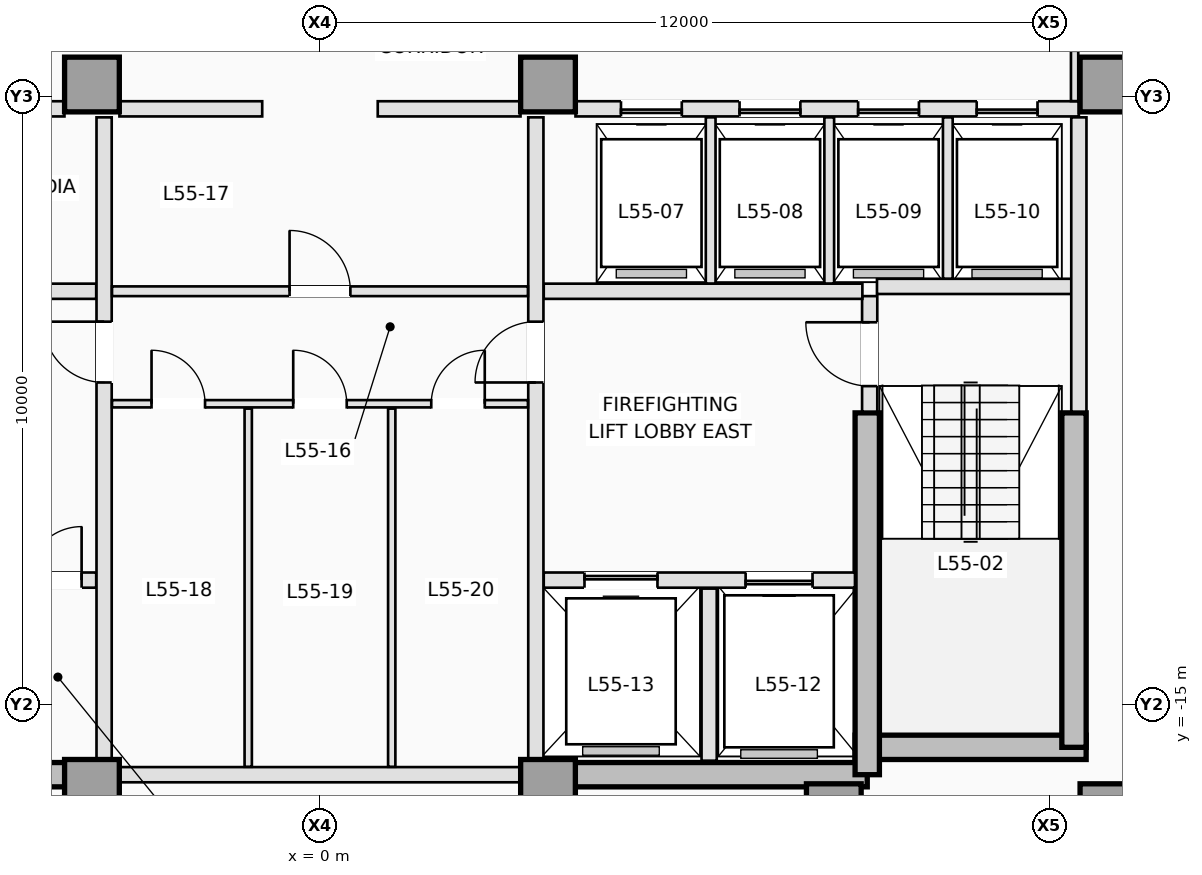
"""IFC4 building model, lengths in metres.
Left out: names, types, materials, properties, quantities, classifications, styles, units other than length and angle.
Written with IfcOpenShell. Run it as: python <this file> out.ifc"""

import sys

from ifc_helpers import new_model, si_unit, direction, frame, frame_2d, origin, origin_2d, place, context, subcontext, project, spatial, rectangle, extrude, element, fill, save


model = new_model("IFC4")
c1 = context("Model", 3, precision=1e-05, world=origin(), true_north=direction((0.0, 1.0)))
c2 = subcontext(c1, "Body", "Model", "MODEL_VIEW")
j1 = project(units=[si_unit("LENGTHUNIT", "METRE"), si_unit("PLANEANGLEUNIT", "RADIAN")], contexts=[c1])
p1 = place(None, origin())
s1 = spatial("IfcSite", under=j1, at=p1, CompositionType="ELEMENT")
p2 = place(p1, origin())
s2 = spatial("IfcBuilding", under=s1, at=p2, CompositionType="ELEMENT")
p3 = place(p2, frame((0.0, 0.0, 200.9)))
s3 = spatial("IfcBuildingStorey", under=s2, at=p3, CompositionType="ELEMENT", Elevation=200.9)
for number, where, z_axis, x_axis in (
    (1, (-9.0, -16.15, 0.0), (0.0, 0.0, 1.0), (1.0, 0.0, 0.0)),
    (2, (3.75, -16.15, 0.0), (0.0, 0.0, 1.0), (1.0, 0.0, 0.0)),
):
    element("IfcWall", number, at=place(p3, frame(where, z_axis=z_axis, x_axis=x_axis)), inside=s3, PredefinedType="SHEAR", context=c2, shape_type="SweptSolid", body=[
        extrude(rectangle(XDim=5.25, YDim=0.4, at=frame_2d((2.625, 0.0))), origin(), (0.0, 0.0, 1.0), 3.5),
    ])
p4 = place(p3, frame((8.8, -15.7, 0.0), z_axis=(0.0, 0.0, 1.0), x_axis=(1.0, 0.0, 0.0)))
e3 = element("IfcWall", 3, at=p4, inside=s3, PredefinedType="SHEAR", context=c2, shape_type="SweptSolid", body=[
    extrude(rectangle(XDim=3.8, YDim=0.4, at=frame_2d((1.9, 0.0))), origin(), (0.0, 0.0, 1.0), 3.5),
])
p5 = place(p3, frame((12.4, -15.7, 0.0), z_axis=(0.0, 0.0, 1.0), x_axis=(0.0, 1.0, 0.0)))
e4 = element("IfcWall", 4, at=p5, inside=s3, PredefinedType="SHEAR", context=c2, shape_type="SweptSolid", body=[
    extrude(rectangle(XDim=5.5, YDim=0.4, at=frame_2d((2.75, 0.0))), origin(), (0.0, 0.0, 1.0), 3.5),
])
p6 = place(p3, frame((9.0, -16.15, 0.0), z_axis=(0.0, 0.0, 1.0), x_axis=(0.0, 1.0, 0.0)))
e5 = element("IfcWall", 5, at=p6, inside=s3, PredefinedType="SHEAR", context=c2, shape_type="SweptSolid", body=[
    extrude(rectangle(XDim=5.95, YDim=0.4, at=frame_2d((2.975, 0.0))), origin(), (0.0, 0.0, 1.0), 3.5),
])
for number, where, z_axis, x_axis in (
    (6, (-3.75, -16.35, 0.0), (0.0, 0.0, 1.0), (1.0, 0.0, 0.0)),
    (7, (3.75, -16.35, 0.0), (0.0, 0.0, 1.0), (1.0, 0.0, 0.0)),
    (8, (8.45, -16.75, 0.0), (0.0, 0.0, 1.0), (1.0, 0.0, 0.0)),
    (9, (12.95, -16.75, 0.0), (0.0, 0.0, 1.0), (1.0, 0.0, 0.0)),
    (10, (-3.75, -4.8, 0.0), (0.0, 0.0, 1.0), (1.0, 0.0, 0.0)),
    (11, (3.75, -4.8, 0.0), (0.0, 0.0, 1.0), (1.0, 0.0, 0.0)),
    (12, (12.95, -4.8, 0.0), (0.0, 0.0, 1.0), (1.0, 0.0, 0.0)),
):
    element("IfcColumn", number, at=place(p3, frame(where, z_axis=z_axis, x_axis=x_axis)), inside=s3, PredefinedType="COLUMN", context=c2, shape_type="SweptSolid", body=[
        extrude(rectangle(XDim=0.9, YDim=0.9, at=origin_2d()), origin(), (0.0, 0.0, 1.0), 3.5),
    ])
p7 = place(p3, frame((9.04, -10.18, 0.0), z_axis=(0.0, 0.0, 1.0), x_axis=(0.0, 1.0, 0.0)))
e13 = element("IfcWall", 13, at=p7, inside=s3, PredefinedType="PARTITIONING", context=c2, shape_type="SweptSolid", body=[
    extrude(rectangle(XDim=1.9, YDim=0.25, at=frame_2d((0.95, 0.0))), origin(), (0.0, 0.0, 1.0), 3.25),
])
p8 = place(p7, frame((0.42, 0.0, 0.0)))
e14 = element("IfcOpeningElement", 14, at=p8, cuts=e13, PredefinedType="OPENING", context=c2, shape_type="SweptSolid", body=[
    extrude(rectangle(XDim=1.05, YDim=2.15, at=frame_2d((0.525, 1.075))), frame((0.0, 0.135, 0.0), z_axis=(0.0, -1.0, 0.0), x_axis=(1.0, 0.0, 0.0)), (0.0, 0.0, 1.0), 0.27),
])
p9 = place(p3, frame((9.16, -8.12, 0.0), z_axis=(0.0, 0.0, 1.0), x_axis=(1.0, 0.0, 0.0)))
e15 = element("IfcWall", 15, at=p9, inside=s3, PredefinedType="PARTITIONING", context=c2, shape_type="SweptSolid", body=[
    extrude(rectangle(XDim=3.22, YDim=0.25, at=frame_2d((1.61, 0.0))), origin(), (0.0, 0.0, 1.0), 3.25),
])
p10 = place(p3, frame((12.48, -10.18, 0.0), z_axis=(0.0, 0.0, 1.0), x_axis=(0.0, 1.0, 0.0)))
e16 = element("IfcWall", 16, at=p10, inside=s3, PredefinedType="PARTITIONING", context=c2, shape_type="SweptSolid", body=[
    extrude(rectangle(XDim=4.84, YDim=0.25, at=frame_2d((2.42, 0.0))), origin(), (0.0, 0.0, 1.0), 3.25),
])
p11 = place(p3, frame((-8.798, -12.95, 0.0), z_axis=(0.0, 0.0, 1.0), x_axis=(1.0, 0.0, 0.0)))
e17 = element("IfcWall", 17, at=p11, inside=s3, PredefinedType="PARTITIONING", context=c2, shape_type="SweptSolid", body=[
    extrude(rectangle(XDim=5.118, YDim=0.25, at=frame_2d((2.559, 0.0))), origin(), (0.0, 0.0, 1.0), 3.25),
])
p12 = place(p11, frame((0.698, 0.0, 0.0)))
e18 = element("IfcOpeningElement", 18, at=p12, cuts=e17, PredefinedType="OPENING", context=c2, shape_type="SweptSolid", body=[
    extrude(rectangle(XDim=1.1, YDim=2.15, at=frame_2d((0.55, 1.075))), frame((0.0, 0.135, 0.0), z_axis=(0.0, -1.0, 0.0), x_axis=(1.0, 0.0, 0.0)), (0.0, 0.0, 1.0), 0.27),
])
p13 = place(p11, frame((2.598, 0.0, 0.0)))
e19 = element("IfcOpeningElement", 19, at=p13, cuts=e17, PredefinedType="OPENING", context=c2, shape_type="SweptSolid", body=[
    extrude(rectangle(XDim=0.88, YDim=2.1, at=frame_2d((0.44, 1.05))), frame((0.0, 0.135, 0.0), z_axis=(0.0, -1.0, 0.0), x_axis=(1.0, 0.0, 0.0)), (0.0, 0.0, 1.0), 0.27),
])
p14 = place(p11, frame((3.998, 0.0, 0.0)))
e20 = element("IfcOpeningElement", 20, at=p14, cuts=e17, PredefinedType="OPENING", context=c2, shape_type="SweptSolid", body=[
    extrude(rectangle(XDim=0.88, YDim=2.1, at=frame_2d((0.44, 1.05))), frame((0.0, 0.135, 0.0), z_axis=(0.0, -1.0, 0.0), x_axis=(1.0, 0.0, 0.0)), (0.0, 0.0, 1.0), 0.27),
])
p15 = place(p3, frame((3.68, -12.95, 0.0), z_axis=(0.0, 0.0, 1.0), x_axis=(1.0, 0.0, 0.0)))
e21 = element("IfcWall", 21, at=p15, inside=s3, PredefinedType="PARTITIONING", context=c2, shape_type="SweptSolid", body=[
    extrude(rectangle(XDim=5.118, YDim=0.25, at=frame_2d((2.559, 0.0))), origin(), (0.0, 0.0, 1.0), 3.25),
])
p16 = place(p15, frame((3.32, 0.0, 0.0)))
e22 = element("IfcOpeningElement", 22, at=p16, cuts=e21, PredefinedType="OPENING", context=c2, shape_type="SweptSolid", body=[
    extrude(rectangle(XDim=1.1, YDim=2.15, at=frame_2d((0.55, 1.075))), frame((0.0, 0.135, 0.0), z_axis=(0.0, -1.0, 0.0), x_axis=(1.0, 0.0, 0.0)), (0.0, 0.0, 1.0), 0.27),
])
p17 = place(p15, frame((0.67, 0.0, 0.0)))
e23 = element("IfcOpeningElement", 23, at=p17, cuts=e21, PredefinedType="OPENING", context=c2, shape_type="SweptSolid", body=[
    extrude(rectangle(XDim=1.2, YDim=2.15, at=frame_2d((0.6, 1.075))), frame((0.0, 0.135, 0.0), z_axis=(0.0, -1.0, 0.0), x_axis=(1.0, 0.0, 0.0)), (0.0, 0.0, 1.0), 0.27),
])
p18 = place(p3, frame((6.4, -15.92, 0.0), z_axis=(0.0, 0.0, 1.0), x_axis=(0.0, 1.0, 0.0)))
e24 = element("IfcWall", 24, at=p18, inside=s3, PredefinedType="PARTITIONING", context=c2, shape_type="SweptSolid", body=[
    extrude(rectangle(XDim=2.83, YDim=0.25, at=frame_2d((1.415, 0.0))), origin(), (0.0, 0.0, 1.0), 3.25),
])
for number, where, z_axis, x_axis in (
    (25, (-8.92, -8.2, 0.0), (0.0, 0.0, 1.0), (1.0, 0.0, 0.0)),
    (26, (3.68, -8.2, 0.0), (0.0, 0.0, 1.0), (1.0, 0.0, 0.0)),
):
    element("IfcWall", number, at=place(p3, frame(where, z_axis=z_axis, x_axis=x_axis)), inside=s3, PredefinedType="PARTITIONING", context=c2, shape_type="SweptSolid", body=[
        extrude(rectangle(XDim=5.24, YDim=0.25, at=frame_2d((2.62, 0.0))), origin(), (0.0, 0.0, 1.0), 3.25),
    ])
p19 = place(p3, frame((-3.55, -15.898, 0.0), z_axis=(0.0, 0.0, 1.0), x_axis=(0.0, 1.0, 0.0)))
e27 = element("IfcWall", 27, at=p19, inside=s3, PredefinedType="PARTITIONING", context=c2, shape_type="SweptSolid", body=[
    extrude(rectangle(XDim=10.558, YDim=0.25, at=frame_2d((5.279, 0.0))), origin(), (0.0, 0.0, 1.0), 3.25),
])
p20 = place(p19, frame((6.198, 0.0, 0.0)))
e28 = element("IfcOpeningElement", 28, at=p20, cuts=e27, PredefinedType="OPENING", context=c2, shape_type="SweptSolid", body=[
    extrude(rectangle(XDim=1.0, YDim=2.15, at=frame_2d((0.5, 1.075))), frame((0.0, 0.135, 0.0), z_axis=(0.0, -1.0, 0.0), x_axis=(1.0, 0.0, 0.0)), (0.0, 0.0, 1.0), 0.27),
])
p21 = place(p3, frame((3.55, -15.898, 0.0), z_axis=(0.0, 0.0, 1.0), x_axis=(0.0, 1.0, 0.0)))
e29 = element("IfcWall", 29, at=p21, inside=s3, PredefinedType="PARTITIONING", context=c2, shape_type="SweptSolid", body=[
    extrude(rectangle(XDim=10.558, YDim=0.25, at=frame_2d((5.279, 0.0))), origin(), (0.0, 0.0, 1.0), 3.25),
])
p22 = place(p21, frame((6.198, 0.0, 0.0)))
e30 = element("IfcOpeningElement", 30, at=p22, cuts=e29, PredefinedType="OPENING", context=c2, shape_type="SweptSolid", body=[
    extrude(rectangle(XDim=1.0, YDim=2.15, at=frame_2d((0.5, 1.075))), frame((0.0, 0.135, 0.0), z_axis=(0.0, -1.0, 0.0), x_axis=(1.0, 0.0, 0.0)), (0.0, 0.0, 1.0), 0.27),
])
p23 = place(p3, frame((-12.48, -5.2, 0.0), z_axis=(0.0, 0.0, 1.0), x_axis=(1.0, 0.0, 0.0)))
e31 = element("IfcWall", 31, at=p23, inside=s3, PredefinedType="PARTITIONING", context=c2, shape_type="SweptSolid", body=[
    extrude(rectangle(XDim=8.278, YDim=0.25, at=frame_2d((4.139, 0.0))), origin(), (0.0, 0.0, 1.0), 3.25),
])
p24 = place(p23, frame((3.05, 0.0, 0.0)))
e32 = element("IfcOpeningElement", 32, at=p24, cuts=e31, PredefinedType="OPENING", context=c2, shape_type="SweptSolid", body=[
    extrude(rectangle(XDim=0.92, YDim=2.12, at=frame_2d((0.46, 1.06))), frame((0.0, 0.135, 0.0), z_axis=(0.0, -1.0, 0.0), x_axis=(1.0, 0.0, 0.0)), (0.0, 0.0, 1.0), 0.27),
])
p25 = place(p23, frame((6.15, 0.0, 0.0)))
e33 = element("IfcOpeningElement", 33, at=p25, cuts=e31, PredefinedType="OPENING", context=c2, shape_type="SweptSolid", body=[
    extrude(rectangle(XDim=0.92, YDim=2.12, at=frame_2d((0.46, 1.06))), frame((0.0, 0.135, 0.0), z_axis=(0.0, -1.0, 0.0), x_axis=(1.0, 0.0, 0.0)), (0.0, 0.0, 1.0), 0.27),
])
p26 = place(p3, frame((4.202, -5.2, 0.0), z_axis=(0.0, 0.0, 1.0), x_axis=(1.0, 0.0, 0.0)))
e34 = element("IfcWall", 34, at=p26, inside=s3, PredefinedType="PARTITIONING", context=c2, shape_type="SweptSolid", body=[
    extrude(rectangle(XDim=8.278, YDim=0.25, at=frame_2d((4.139, 0.0))), origin(), (0.0, 0.0, 1.0), 3.25),
])
p27 = place(p26, frame((0.748, 0.0, 0.0)))
e35 = element("IfcOpeningElement", 35, at=p27, cuts=e34, PredefinedType="OPENING", context=c2, shape_type="SweptSolid", body=[
    extrude(rectangle(XDim=1.0, YDim=2.15, at=frame_2d((0.5, 1.075))), frame((0.0, 0.135, 0.0), z_axis=(0.0, -1.0, 0.0), x_axis=(1.0, 0.0, 0.0)), (0.0, 0.0, 1.0), 0.27),
])
p28 = place(p26, frame((2.698, 0.0, 0.0)))
e36 = element("IfcOpeningElement", 36, at=p28, cuts=e34, PredefinedType="OPENING", context=c2, shape_type="SweptSolid", body=[
    extrude(rectangle(XDim=1.0, YDim=2.15, at=frame_2d((0.5, 1.075))), frame((0.0, 0.135, 0.0), z_axis=(0.0, -1.0, 0.0), x_axis=(1.0, 0.0, 0.0)), (0.0, 0.0, 1.0), 0.27),
])
p29 = place(p26, frame((4.648, 0.0, 0.0)))
e37 = element("IfcOpeningElement", 37, at=p29, cuts=e34, PredefinedType="OPENING", context=c2, shape_type="SweptSolid", body=[
    extrude(rectangle(XDim=1.0, YDim=2.15, at=frame_2d((0.5, 1.075))), frame((0.0, 0.135, 0.0), z_axis=(0.0, -1.0, 0.0), x_axis=(1.0, 0.0, 0.0)), (0.0, 0.0, 1.0), 0.27),
])
p30 = place(p26, frame((6.598, 0.0, 0.0)))
e38 = element("IfcOpeningElement", 38, at=p30, cuts=e34, PredefinedType="OPENING", context=c2, shape_type="SweptSolid", body=[
    extrude(rectangle(XDim=1.0, YDim=2.15, at=frame_2d((0.5, 1.075))), frame((0.0, 0.135, 0.0), z_axis=(0.0, -1.0, 0.0), x_axis=(1.0, 0.0, 0.0)), (0.0, 0.0, 1.0), 0.27),
])
for number, where, z_axis, x_axis in (
    (39, (-3.298, -5.2, 0.0), (0.0, 0.0, 1.0), (1.0, 0.0, 0.0)),
    (40, (0.95, -5.2, 0.0), (0.0, 0.0, 1.0), (1.0, 0.0, 0.0)),
):
    element("IfcWall", number, at=place(p3, frame(where, z_axis=z_axis, x_axis=x_axis)), inside=s3, PredefinedType="PARTITIONING", context=c2, shape_type="SweptSolid", body=[
        extrude(rectangle(XDim=2.348, YDim=0.25, at=frame_2d((1.174, 0.0))), origin(), (0.0, 0.0, 1.0), 3.25),
    ])
for number, where, z_axis, x_axis in (
    (41, (6.425, -8.073, 0.0), (0.0, 0.0, 1.0), (0.0, 1.0, 0.0)),
    (42, (8.375, -8.073, 0.0), (0.0, 0.0, 1.0), (0.0, 1.0, 0.0)),
):
    element("IfcWall", number, at=place(p3, frame(where, z_axis=z_axis, x_axis=x_axis)), inside=s3, PredefinedType="PARTITIONING", context=c2, shape_type="SweptSolid", body=[
        extrude(rectangle(XDim=2.733, YDim=0.16, at=frame_2d((1.366, 0.0))), origin(), (0.0, 0.0, 1.0), 3.25),
    ])
p31 = place(p3, frame((10.325, -7.993, 0.0), z_axis=(0.0, 0.0, 1.0), x_axis=(0.0, 1.0, 0.0)))
e43 = element("IfcWall", 43, at=p31, inside=s3, PredefinedType="PARTITIONING", context=c2, shape_type="SweptSolid", body=[
    extrude(rectangle(XDim=2.653, YDim=0.16, at=frame_2d((1.326, 0.0))), origin(), (0.0, 0.0, 1.0), 3.25),
])
p32 = place(p3, frame((-3.298, -16.15, 0.0), z_axis=(0.0, 0.0, 1.0), x_axis=(1.0, 0.0, 0.0)))
e44 = element("IfcWall", 44, at=p32, inside=s3, PredefinedType="PARTITIONING", context=c2, shape_type="SweptSolid", body=[
    extrude(rectangle(XDim=6.596, YDim=0.25, at=frame_2d((3.298, 0.0))), origin(), (0.0, 0.0, 1.0), 2.45),
])
p33 = place(p3, frame((-3.42, -8.2, 0.0), z_axis=(0.0, 0.0, 1.0), x_axis=(1.0, 0.0, 0.0)))
e45 = element("IfcWall", 45, at=p33, inside=s3, PredefinedType="PARTITIONING", context=c2, shape_type="SweptSolid", body=[
    extrude(rectangle(XDim=6.84, YDim=0.16, at=frame_2d((3.42, 0.0))), origin(), (0.0, 0.0, 1.0), 3.25),
])
p34 = place(p33, frame((2.92, 0.0, 0.0)))
e46 = element("IfcOpeningElement", 46, at=p34, cuts=e45, PredefinedType="OPENING", context=c2, shape_type="SweptSolid", body=[
    extrude(rectangle(XDim=1.0, YDim=2.15, at=frame_2d((0.5, 1.075))), frame((0.0, 0.09, 0.0), z_axis=(0.0, -1.0, 0.0), x_axis=(1.0, 0.0, 0.0)), (0.0, 0.0, 1.0), 0.18),
])
p35 = place(p3, frame((-3.42, -10.05, 0.0), z_axis=(0.0, 0.0, 1.0), x_axis=(1.0, 0.0, 0.0)))
e47 = element("IfcWall", 47, at=p35, inside=s3, PredefinedType="PARTITIONING", context=c2, shape_type="SweptSolid", body=[
    extrude(rectangle(XDim=6.84, YDim=0.12, at=frame_2d((3.42, 0.0))), origin(), (0.0, 0.0, 1.0), 3.25),
])
p36 = place(p35, frame((0.65, 0.0, 0.0)))
e48 = element("IfcOpeningElement", 48, at=p36, cuts=e47, PredefinedType="OPENING", context=c2, shape_type="SweptSolid", body=[
    extrude(rectangle(XDim=0.88, YDim=2.12, at=frame_2d((0.44, 1.06))), frame((0.0, 0.07, 0.0), z_axis=(0.0, -1.0, 0.0), x_axis=(1.0, 0.0, 0.0)), (0.0, 0.0, 1.0), 0.14),
])
p37 = place(p35, frame((2.98, 0.0, 0.0)))
e49 = element("IfcOpeningElement", 49, at=p37, cuts=e47, PredefinedType="OPENING", context=c2, shape_type="SweptSolid", body=[
    extrude(rectangle(XDim=0.88, YDim=2.12, at=frame_2d((0.44, 1.06))), frame((0.0, 0.07, 0.0), z_axis=(0.0, -1.0, 0.0), x_axis=(1.0, 0.0, 0.0)), (0.0, 0.0, 1.0), 0.14),
])
p38 = place(p35, frame((5.25, 0.0, 0.0)))
e50 = element("IfcOpeningElement", 50, at=p38, cuts=e47, PredefinedType="OPENING", context=c2, shape_type="SweptSolid", body=[
    extrude(rectangle(XDim=0.88, YDim=2.12, at=frame_2d((0.44, 1.06))), frame((0.0, 0.07, 0.0), z_axis=(0.0, -1.0, 0.0), x_axis=(1.0, 0.0, 0.0)), (0.0, 0.0, 1.0), 0.14),
])
for number, where, z_axis, x_axis in (
    (51, (-1.18, -16.02, 0.0), (0.0, 0.0, 1.0), (0.0, 1.0, 0.0)),
    (52, (1.18, -16.02, 0.0), (0.0, 0.0, 1.0), (0.0, 1.0, 0.0)),
):
    element("IfcWall", number, at=place(p3, frame(where, z_axis=z_axis, x_axis=x_axis)), inside=s3, PredefinedType="PARTITIONING", context=c2, shape_type="SweptSolid", body=[
        extrude(rectangle(XDim=5.89, YDim=0.12, at=frame_2d((2.945, 0.0))), origin(), (0.0, 0.0, 1.0), 3.25),
    ])
p39 = place(p3, frame((12.41, -2.462, 0.0), z_axis=(0.0, 0.0, 1.0), x_axis=(0.0, -1.0, 0.0)))
e53 = element("IfcWall", 53, at=p39, inside=s3, PredefinedType="PARTITIONING", context=c2, shape_type="SweptSolid", body=[
    extrude(rectangle(XDim=2.611, YDim=0.12, at=frame_2d((1.306, 0.0))), origin(), (0.0, 0.0, 1.0), 3.25),
])
p40 = place(p39, frame((0.863, 0.0, 0.0)))
e54 = element("IfcOpeningElement", 54, at=p40, cuts=e53, PredefinedType="OPENING", context=c2, shape_type="SweptSolid", body=[
    extrude(rectangle(XDim=0.92, YDim=2.12, at=frame_2d((0.46, 1.06))), frame((0.0, 0.07, 0.0), z_axis=(0.0, -1.0, 0.0), x_axis=(1.0, 0.0, 0.0)), (0.0, 0.0, 1.0), 0.14),
])
p41 = place(p27, origin())
e55 = element("IfcDoor", 55, at=p41, inside=s3, OperationType="SLIDING_TO_RIGHT", PredefinedType="DOOR", context=c2, shape_type="SweptSolid", body=[
    extrude(rectangle(XDim=1.0, YDim=2.15, at=frame_2d((0.5, 1.075))), frame((0.0, 0.025, 0.0), z_axis=(0.0, -1.0, 0.0), x_axis=(1.0, 0.0, 0.0)), (0.0, 0.0, 1.0), 0.05),
])
fill(e35, e55)
p42 = place(p28, origin())
e56 = element("IfcDoor", 56, at=p42, inside=s3, OperationType="SLIDING_TO_RIGHT", PredefinedType="DOOR", context=c2, shape_type="SweptSolid", body=[
    extrude(rectangle(XDim=1.0, YDim=2.15, at=frame_2d((0.5, 1.075))), frame((0.0, 0.025, 0.0), z_axis=(0.0, -1.0, 0.0), x_axis=(1.0, 0.0, 0.0)), (0.0, 0.0, 1.0), 0.05),
])
fill(e36, e56)
p43 = place(p29, origin())
e57 = element("IfcDoor", 57, at=p43, inside=s3, OperationType="SLIDING_TO_RIGHT", PredefinedType="DOOR", context=c2, shape_type="SweptSolid", body=[
    extrude(rectangle(XDim=1.0, YDim=2.15, at=frame_2d((0.5, 1.075))), frame((0.0, 0.025, 0.0), z_axis=(0.0, -1.0, 0.0), x_axis=(1.0, 0.0, 0.0)), (0.0, 0.0, 1.0), 0.05),
])
fill(e37, e57)
p44 = place(p30, origin())
e58 = element("IfcDoor", 58, at=p44, inside=s3, OperationType="SLIDING_TO_RIGHT", PredefinedType="DOOR", context=c2, shape_type="SweptSolid", body=[
    extrude(rectangle(XDim=1.0, YDim=2.15, at=frame_2d((0.5, 1.075))), frame((0.0, 0.025, 0.0), z_axis=(0.0, -1.0, 0.0), x_axis=(1.0, 0.0, 0.0)), (0.0, 0.0, 1.0), 0.05),
])
fill(e38, e58)
p45 = place(p16, origin())
e59 = element("IfcDoor", 59, at=p45, inside=s3, OperationType="SLIDING_TO_RIGHT", PredefinedType="DOOR", context=c2, shape_type="SweptSolid", body=[
    extrude(rectangle(XDim=1.1, YDim=2.15, at=frame_2d((0.55, 1.075))), frame((0.0, 0.025, 0.0), z_axis=(0.0, -1.0, 0.0), x_axis=(1.0, 0.0, 0.0)), (0.0, 0.0, 1.0), 0.05),
])
fill(e22, e59)
p46 = place(p17, origin())
e60 = element("IfcDoor", 60, at=p46, inside=s3, OperationType="SLIDING_TO_LEFT", PredefinedType="DOOR", context=c2, shape_type="SweptSolid", body=[
    extrude(rectangle(XDim=1.2, YDim=2.15, at=frame_2d((0.6, 1.075))), frame((0.0, 0.025, 0.0), z_axis=(0.0, -1.0, 0.0), x_axis=(1.0, 0.0, 0.0)), (0.0, 0.0, 1.0), 0.05),
])
fill(e23, e60)
p47 = place(p8, origin())
e61 = element("IfcDoor", 61, at=p47, inside=s3, OperationType="SINGLE_SWING_RIGHT", PredefinedType="DOOR", context=c2, shape_type="SweptSolid", body=[
    extrude(rectangle(XDim=1.05, YDim=2.15, at=frame_2d((0.525, 1.075))), frame((0.0, 0.025, 0.0), z_axis=(0.0, -1.0, 0.0), x_axis=(1.0, 0.0, 0.0)), (0.0, 0.0, 1.0), 0.05),
])
fill(e14, e61)
p48 = place(p14, origin())
e62 = element("IfcDoor", 62, at=p48, inside=s3, OperationType="SINGLE_SWING_RIGHT", PredefinedType="TRAPDOOR", context=c2, shape_type="SweptSolid", body=[
    extrude(rectangle(XDim=0.88, YDim=2.1, at=frame_2d((0.44, 1.05))), frame((0.0, 0.025, 0.0), z_axis=(0.0, -1.0, 0.0), x_axis=(1.0, 0.0, 0.0)), (0.0, 0.0, 1.0), 0.05),
])
fill(e20, e62)
p49 = place(p20, origin())
e63 = element("IfcDoor", 63, at=p49, inside=s3, OperationType="SINGLE_SWING_RIGHT", PredefinedType="DOOR", context=c2, shape_type="SweptSolid", body=[
    extrude(rectangle(XDim=1.0, YDim=2.15, at=frame_2d((0.5, 1.075))), frame((0.0, 0.025, 0.0), z_axis=(0.0, -1.0, 0.0), x_axis=(1.0, 0.0, 0.0)), (0.0, 0.0, 1.0), 0.05),
])
fill(e28, e63)
p50 = place(p22, origin())
e64 = element("IfcDoor", 64, at=p50, inside=s3, OperationType="SINGLE_SWING_LEFT", PredefinedType="DOOR", context=c2, shape_type="SweptSolid", body=[
    extrude(rectangle(XDim=1.0, YDim=2.15, at=frame_2d((0.5, 1.075))), frame((0.0, 0.025, 0.0), z_axis=(0.0, -1.0, 0.0), x_axis=(1.0, 0.0, 0.0)), (0.0, 0.0, 1.0), 0.05),
])
fill(e30, e64)
p51 = place(p34, origin())
e65 = element("IfcDoor", 65, at=p51, inside=s3, OperationType="SINGLE_SWING_LEFT", PredefinedType="DOOR", context=c2, shape_type="SweptSolid", body=[
    extrude(rectangle(XDim=1.0, YDim=2.15, at=frame_2d((0.5, 1.075))), frame((0.0, 0.025, 0.0), z_axis=(0.0, -1.0, 0.0), x_axis=(1.0, 0.0, 0.0)), (0.0, 0.0, 1.0), 0.05),
])
fill(e46, e65)
p52 = place(p36, origin())
e66 = element("IfcDoor", 66, at=p52, inside=s3, OperationType="SINGLE_SWING_LEFT", PredefinedType="DOOR", context=c2, shape_type="SweptSolid", body=[
    extrude(rectangle(XDim=0.88, YDim=2.12, at=frame_2d((0.44, 1.06))), frame((0.0, 0.025, 0.0), z_axis=(0.0, -1.0, 0.0), x_axis=(1.0, 0.0, 0.0)), (0.0, 0.0, 1.0), 0.05),
])
fill(e48, e66)
p53 = place(p37, origin())
e67 = element("IfcDoor", 67, at=p53, inside=s3, OperationType="SINGLE_SWING_LEFT", PredefinedType="DOOR", context=c2, shape_type="SweptSolid", body=[
    extrude(rectangle(XDim=0.88, YDim=2.12, at=frame_2d((0.44, 1.06))), frame((0.0, 0.025, 0.0), z_axis=(0.0, -1.0, 0.0), x_axis=(1.0, 0.0, 0.0)), (0.0, 0.0, 1.0), 0.05),
])
fill(e49, e67)
p54 = place(p38, origin())
e68 = element("IfcDoor", 68, at=p54, inside=s3, OperationType="SINGLE_SWING_RIGHT", PredefinedType="DOOR", context=c2, shape_type="SweptSolid", body=[
    extrude(rectangle(XDim=0.88, YDim=2.12, at=frame_2d((0.44, 1.06))), frame((0.0, 0.025, 0.0), z_axis=(0.0, -1.0, 0.0), x_axis=(1.0, 0.0, 0.0)), (0.0, 0.0, 1.0), 0.05),
])
fill(e50, e68)
save(model, sys.argv[1])
